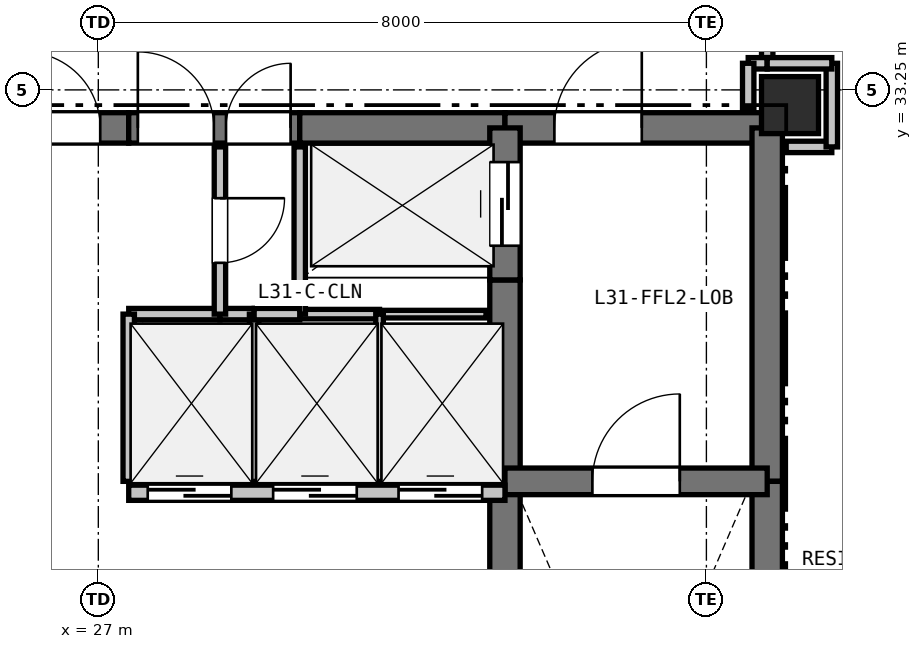
"""IFC4 building model, lengths in metres.
Left out: names, types, materials, properties, quantities, classifications, styles, units other than length and angle.
Written with IfcOpenShell. Run it as: python <this file> out.ifc"""

import sys

from ifc_helpers import new_model, si_unit, direction, frame, frame_2d, origin, origin_2d, place, context, subcontext, project, spatial, rectangle, extrude, element, fill, save


model = new_model("IFC4")
c1 = context("Model", 3, precision=1e-05, world=origin(), true_north=direction((0.0, 1.0)))
c2 = subcontext(c1, "Body", "Model", "MODEL_VIEW")
j1 = project(units=[si_unit("LENGTHUNIT", "METRE"), si_unit("PLANEANGLEUNIT", "RADIAN")], contexts=[c1])
p1 = place(None, origin())
s1 = spatial("IfcSite", under=j1, at=p1, CompositionType="ELEMENT")
p2 = place(p1, origin())
s2 = spatial("IfcBuilding", under=s1, at=p2, CompositionType="ELEMENT")
p3 = place(p2, frame((0.0, 0.0, 113.1)))
s3 = spatial("IfcBuildingStorey", under=s2, at=p3, CompositionType="ELEMENT", Elevation=113.1)
p4 = place(p3, frame((36.1, 33.05, 0.0), z_axis=(0.0, 0.0, 1.0), x_axis=(1.0, 0.0, 0.0)))
e1 = element("IfcColumn", 1, at=p4, inside=s3, PredefinedType="COLUMN", context=c2, shape_type="SweptSolid", body=[
    extrude(rectangle(XDim=0.75, YDim=0.75, at=origin_2d()), origin(), (0.0, 0.0, 1.0), 3.3),
])
p5 = place(p3, frame((25.65, 32.75, 0.0), z_axis=(0.0, 0.0, 1.0), x_axis=(1.0, 0.0, 0.0)))
e2 = element("IfcWall", 2, at=p5, inside=s3, PredefinedType="SHEAR", context=c2, shape_type="SweptSolid", body=[
    extrude(rectangle(XDim=1.75, YDim=0.4, at=frame_2d((0.875, 0.0))), origin(), (0.0, 0.0, 1.0), 3.02),
])
p6 = place(p5, frame((0.375, 0.0, 0.0)))
e3 = element("IfcOpeningElement", 3, at=p6, cuts=e2, PredefinedType="OPENING", context=c2, shape_type="SweptSolid", body=[
    extrude(rectangle(XDim=1.0, YDim=2.15, at=frame_2d((0.5, 1.075))), frame((0.0, 0.21, 0.0), z_axis=(0.0, -1.0, 0.0), x_axis=(1.0, 0.0, 0.0)), (0.0, 0.0, 1.0), 0.42),
])
p7 = place(p3, frame((27.4, 32.75, 0.0), z_axis=(0.0, 0.0, 1.0), x_axis=(1.0, 0.0, 0.0)))
e4 = element("IfcWall", 4, at=p7, inside=s3, PredefinedType="SHEAR", context=c2, shape_type="SweptSolid", body=[
    extrude(rectangle(XDim=2.25, YDim=0.4, at=frame_2d((1.125, 0.0))), origin(), (0.0, 0.0, 1.0), 3.02),
])
p8 = place(p7, frame((0.12, 0.0, 0.0)))
e5 = element("IfcOpeningElement", 5, at=p8, cuts=e4, PredefinedType="OPENING", context=c2, shape_type="SweptSolid", body=[
    extrude(rectangle(XDim=1.0, YDim=2.15, at=frame_2d((0.5, 1.075))), frame((0.0, 0.21, 0.0), z_axis=(0.0, -1.0, 0.0), x_axis=(1.0, 0.0, 0.0)), (0.0, 0.0, 1.0), 0.42),
])
p9 = place(p7, frame((1.28, 0.0, 0.0)))
e6 = element("IfcOpeningElement", 6, at=p9, cuts=e4, PredefinedType="OPENING", context=c2, shape_type="SweptSolid", body=[
    extrude(rectangle(XDim=0.85, YDim=2.1, at=frame_2d((0.425, 1.05))), frame((0.0, 0.21, 0.0), z_axis=(0.0, -1.0, 0.0), x_axis=(1.0, 0.0, 0.0)), (0.0, 0.0, 1.0), 0.42),
])
p10 = place(p3, frame((29.65, 32.75, 0.0), z_axis=(0.0, 0.0, 1.0), x_axis=(1.0, 0.0, 0.0)))
e7 = element("IfcWall", 7, at=p10, inside=s3, PredefinedType="SHEAR", context=c2, shape_type="SweptSolid", body=[
    extrude(rectangle(XDim=2.7, YDim=0.4, at=frame_2d((1.35, 0.0))), origin(), (0.0, 0.0, 1.0), 3.02),
])
p11 = place(p3, frame((32.35, 32.75, 0.0), z_axis=(0.0, 0.0, 1.0), x_axis=(1.0, 0.0, 0.0)))
e8 = element("IfcWall", 8, at=p11, inside=s3, PredefinedType="SHEAR", context=c2, shape_type="SweptSolid", body=[
    extrude(rectangle(XDim=3.45, YDim=0.4, at=frame_2d((1.725, 0.0))), origin(), (0.0, 0.0, 1.0), 3.02),
])
p12 = place(p11, frame((0.65, 0.0, 0.0)))
e9 = element("IfcOpeningElement", 9, at=p12, cuts=e8, PredefinedType="OPENING", context=c2, shape_type="SweptSolid", body=[
    extrude(rectangle(XDim=1.15, YDim=2.15, at=frame_2d((0.575, 1.075))), frame((0.0, 0.21, 0.0), z_axis=(0.0, -1.0, 0.0), x_axis=(1.0, 0.0, 0.0)), (0.0, 0.0, 1.0), 0.42),
])
p13 = place(p3, frame((35.8, 32.75, 0.0), z_axis=(0.0, 0.0, 1.0), x_axis=(0.0, -1.0, 0.0)))
e10 = element("IfcWall", 10, at=p13, inside=s3, PredefinedType="SHEAR", context=c2, shape_type="SweptSolid", body=[
    extrude(rectangle(XDim=4.65, YDim=0.4, at=frame_2d((2.325, 0.0))), origin(), (0.0, 0.0, 1.0), 3.02),
])
p14 = place(p3, frame((35.8, 28.1, 0.0), z_axis=(0.0, 0.0, 1.0), x_axis=(0.0, -1.0, 0.0)))
e11 = element("IfcWall", 11, at=p14, inside=s3, PredefinedType="SHEAR", context=c2, shape_type="SweptSolid", body=[
    extrude(rectangle(XDim=7.35, YDim=0.4, at=frame_2d((3.675, 0.0))), origin(), (0.0, 0.0, 1.0), 3.02),
])
p15 = place(p3, frame((32.35, 25.55, 0.0), z_axis=(0.0, 0.0, 1.0), x_axis=(0.0, 1.0, 0.0)))
e12 = element("IfcWall", 12, at=p15, inside=s3, PredefinedType="SHEAR", context=c2, shape_type="SweptSolid", body=[
    extrude(rectangle(XDim=2.4, YDim=0.4, at=frame_2d((1.2, 0.0))), origin(), (0.0, 0.0, 1.0), 3.02),
])
p16 = place(p3, frame((32.35, 27.95, 0.0), z_axis=(0.0, 0.0, 1.0), x_axis=(0.0, 1.0, 0.0)))
e13 = element("IfcWall", 13, at=p16, inside=s3, PredefinedType="SHEAR", context=c2, shape_type="SweptSolid", body=[
    extrude(rectangle(XDim=2.8, YDim=0.4, at=frame_2d((1.4, 0.0))), origin(), (0.0, 0.0, 1.0), 3.02),
])
p17 = place(p3, frame((32.35, 30.75, 0.0), z_axis=(0.0, 0.0, 1.0), x_axis=(0.0, 1.0, 0.0)))
e14 = element("IfcWall", 14, at=p17, inside=s3, PredefinedType="SHEAR", context=c2, shape_type="SweptSolid", body=[
    extrude(rectangle(XDim=2.0, YDim=0.4, at=frame_2d((1.0, 0.0))), origin(), (0.0, 0.0, 1.0), 3.02),
])
p18 = place(p17, frame((0.45, 0.0, 0.0)))
e15 = element("IfcOpeningElement", 15, at=p18, cuts=e14, PredefinedType="OPENING", context=c2, shape_type="SweptSolid", body=[
    extrude(rectangle(XDim=1.1, YDim=2.15, at=frame_2d((0.55, 1.075))), frame((0.0, 0.21, 0.0), z_axis=(0.0, -1.0, 0.0), x_axis=(1.0, 0.0, 0.0)), (0.0, 0.0, 1.0), 0.42),
])
p19 = place(p3, frame((32.35, 28.1, 0.0), z_axis=(0.0, 0.0, 1.0), x_axis=(1.0, 0.0, 0.0)))
e16 = element("IfcWall", 16, at=p19, inside=s3, PredefinedType="SHEAR", context=c2, shape_type="SweptSolid", body=[
    extrude(rectangle(XDim=3.45, YDim=0.35, at=frame_2d((1.725, 0.0))), origin(), (0.0, 0.0, 1.0), 3.02),
])
p20 = place(p19, frame((1.15, 0.0, 0.0)))
e17 = element("IfcOpeningElement", 17, at=p20, cuts=e16, PredefinedType="OPENING", context=c2, shape_type="SweptSolid", body=[
    extrude(rectangle(XDim=1.15, YDim=2.15, at=frame_2d((0.575, 1.075))), frame((0.0, 0.185, 0.0), z_axis=(0.0, -1.0, 0.0), x_axis=(1.0, 0.0, 0.0)), (0.0, 0.0, 1.0), 0.37),
])
p21 = place(p3, frame((27.4, 27.95, 0.0), z_axis=(0.0, 0.0, 1.0), x_axis=(1.0, 0.0, 0.0)))
e18 = element("IfcWall", 18, at=p21, inside=s3, PredefinedType="PARTITIONING", context=c2, shape_type="SweptSolid", body=[
    extrude(rectangle(XDim=4.95, YDim=0.2, at=frame_2d((2.475, 0.0))), origin(), (0.0, 0.0, 1.0), 3.02),
])
p22 = place(p21, frame((0.25, 0.0, 0.0)))
e19 = element("IfcOpeningElement", 19, at=p22, cuts=e18, PredefinedType="OPENING", context=c2, shape_type="SweptSolid", body=[
    extrude(rectangle(XDim=1.1, YDim=2.15, at=frame_2d((0.55, 1.075))), frame((0.0, 0.11, 0.0), z_axis=(0.0, -1.0, 0.0), x_axis=(1.0, 0.0, 0.0)), (0.0, 0.0, 1.0), 0.22),
])
p23 = place(p21, frame((1.9, 0.0, 0.0)))
e20 = element("IfcOpeningElement", 20, at=p23, cuts=e18, PredefinedType="OPENING", context=c2, shape_type="SweptSolid", body=[
    extrude(rectangle(XDim=1.1, YDim=2.15, at=frame_2d((0.55, 1.075))), frame((0.0, 0.11, 0.0), z_axis=(0.0, -1.0, 0.0), x_axis=(1.0, 0.0, 0.0)), (0.0, 0.0, 1.0), 0.22),
])
p24 = place(p21, frame((3.55, 0.0, 0.0)))
e21 = element("IfcOpeningElement", 21, at=p24, cuts=e18, PredefinedType="OPENING", context=c2, shape_type="SweptSolid", body=[
    extrude(rectangle(XDim=1.1, YDim=2.15, at=frame_2d((0.55, 1.075))), frame((0.0, 0.11, 0.0), z_axis=(0.0, -1.0, 0.0), x_axis=(1.0, 0.0, 0.0)), (0.0, 0.0, 1.0), 0.22),
])
p25 = place(p3, frame((32.1, 30.3, 0.0), z_axis=(0.0, 0.0, 1.0), x_axis=(-1.0, 0.0, 0.0)))
e22 = element("IfcWall", 22, at=p25, inside=s3, PredefinedType="PARTITIONING", context=c2, shape_type="SweptSolid", body=[
    extrude(rectangle(XDim=1.4, YDim=0.1, at=frame_2d((0.7, 0.0))), origin(), (0.0, 0.0, 1.0), 3.02),
])
p26 = place(p3, frame((30.7, 30.3, 0.0), z_axis=(0.0, 0.0, 1.0), x_axis=(-1.0, 0.0, 0.0)))
e23 = element("IfcWall", 23, at=p26, inside=s3, PredefinedType="PARTITIONING", context=c2, shape_type="SweptSolid", body=[
    extrude(rectangle(XDim=1.05, YDim=0.125, at=frame_2d((0.525, 0.0))), origin(), (0.0, 0.0, 1.0), 3.02),
])
p27 = place(p3, frame((29.65, 30.3, 0.0), z_axis=(0.0, 0.0, 1.0), x_axis=(0.0, 1.0, 0.0)))
e24 = element("IfcWall", 24, at=p27, inside=s3, PredefinedType="PARTITIONING", context=c2, shape_type="SweptSolid", body=[
    extrude(rectangle(XDim=2.2, YDim=0.15, at=frame_2d((1.1, 0.0))), origin(), (0.0, 0.0, 1.0), 3.02),
])
p28 = place(p3, frame((27.4, 30.3, 0.0), z_axis=(0.0, 0.0, 1.0), x_axis=(1.0, 0.0, 0.0)))
e25 = element("IfcWall", 25, at=p28, inside=s3, PredefinedType="PARTITIONING", context=c2, shape_type="SweptSolid", body=[
    extrude(rectangle(XDim=1.2, YDim=0.15, at=frame_2d((0.6, 0.0))), origin(), (0.0, 0.0, 1.0), 3.02),
])
p29 = place(p3, frame((28.6, 30.3, 0.0), z_axis=(0.0, 0.0, 1.0), x_axis=(1.0, 0.0, 0.0)))
e26 = element("IfcWall", 26, at=p29, inside=s3, PredefinedType="PARTITIONING", context=c2, shape_type="SweptSolid", body=[
    extrude(rectangle(XDim=0.45, YDim=0.15, at=frame_2d((0.225, 0.0))), origin(), (0.0, 0.0, 1.0), 3.02),
])
p30 = place(p3, frame((29.05, 30.3, 0.0), z_axis=(0.0, 0.0, 1.0), x_axis=(0.0, -1.0, 0.0)))
e27 = element("IfcWall", 27, at=p30, inside=s3, PredefinedType="PARTITIONING", context=c2, shape_type="SweptSolid", body=[
    extrude(rectangle(XDim=2.2, YDim=0.125, at=frame_2d((1.1, 0.0))), origin(), (0.0, 0.0, 1.0), 3.02),
])
p31 = place(p3, frame((27.4, 28.1, 0.0), z_axis=(0.0, 0.0, 1.0), x_axis=(0.0, 1.0, 0.0)))
e28 = element("IfcWall", 28, at=p31, inside=s3, PredefinedType="PARTITIONING", context=c2, shape_type="SweptSolid", body=[
    extrude(rectangle(XDim=2.2, YDim=0.15, at=frame_2d((1.1, 0.0))), origin(), (0.0, 0.0, 1.0), 3.02),
])
p32 = place(p3, frame((29.05, 30.3, 0.0), z_axis=(0.0, 0.0, 1.0), x_axis=(1.0, 0.0, 0.0)))
e29 = element("IfcWall", 29, at=p32, inside=s3, PredefinedType="PARTITIONING", context=c2, shape_type="SweptSolid", body=[
    extrude(rectangle(XDim=0.6, YDim=0.15, at=frame_2d((0.3, 0.0))), origin(), (0.0, 0.0, 1.0), 3.02),
])
p33 = place(p3, frame((30.7, 30.3, 0.0), z_axis=(0.0, 0.0, 1.0), x_axis=(0.0, -1.0, 0.0)))
e30 = element("IfcWall", 30, at=p33, inside=s3, PredefinedType="PARTITIONING", context=c2, shape_type="SweptSolid", body=[
    extrude(rectangle(XDim=2.2, YDim=0.1, at=frame_2d((1.1, 0.0))), origin(), (0.0, 0.0, 1.0), 3.02),
])
p34 = place(p3, frame((28.6, 32.5, 0.0), z_axis=(0.0, 0.0, 1.0), x_axis=(0.0, -1.0, 0.0)))
e31 = element("IfcWall", 31, at=p34, inside=s3, PredefinedType="PARTITIONING", context=c2, shape_type="SweptSolid", body=[
    extrude(rectangle(XDim=2.2, YDim=0.15, at=frame_2d((1.1, 0.0))), origin(), (0.0, 0.0, 1.0), 3.02),
])
p35 = place(p34, frame((0.675, 0.0, 0.0)))
e32 = element("IfcOpeningElement", 32, at=p35, cuts=e31, PredefinedType="OPENING", context=c2, shape_type="SweptSolid", body=[
    extrude(rectangle(XDim=0.85, YDim=2.1, at=frame_2d((0.425, 1.05))), frame((0.0, 0.085, 0.0), z_axis=(0.0, -1.0, 0.0), x_axis=(1.0, 0.0, 0.0)), (0.0, 0.0, 1.0), 0.17),
])
p36 = place(p3, frame((35.8, 35.35, 0.0), z_axis=(0.0, 0.0, 1.0), x_axis=(0.0, -1.0, 0.0)))
e33 = element("IfcWall", 33, at=p36, inside=s3, PredefinedType="PARTITIONING", context=c2, shape_type="SweptSolid", body=[
    extrude(rectangle(XDim=1.75, YDim=0.15, at=frame_2d((0.875, 0.0))), origin(), (0.0, 0.0, 1.0), 3.02),
])
p37 = place(p36, frame((0.375, 0.0, 0.0)))
e34 = element("IfcOpeningElement", 34, at=p37, cuts=e33, PredefinedType="OPENING", context=c2, shape_type="SweptSolid", body=[
    extrude(rectangle(XDim=1.0, YDim=2.15, at=frame_2d((0.5, 1.075))), frame((0.0, 0.085, 0.0), z_axis=(0.0, -1.0, 0.0), x_axis=(1.0, 0.0, 0.0)), (0.0, 0.0, 1.0), 0.17),
])
p38 = place(p3, frame((35.8, 33.6, 0.0), z_axis=(0.0, 0.0, 1.0), x_axis=(-1.0, 0.0, 0.0)))
e35 = element("IfcWall", 35, at=p38, inside=s3, PredefinedType="PARTITIONING", context=c2, shape_type="SweptSolid", body=[
    extrude(rectangle(XDim=0.25, YDim=0.15, at=frame_2d((0.125, 0.0))), origin(), (0.0, 0.0, 1.0), 3.02),
])
p39 = place(p3, frame((35.55, 33.6, 0.0), z_axis=(0.0, 0.0, 1.0), x_axis=(0.0, -1.0, 0.0)))
e36 = element("IfcWall", 36, at=p39, inside=s3, PredefinedType="PARTITIONING", context=c2, shape_type="SweptSolid", body=[
    extrude(rectangle(XDim=0.6, YDim=0.15, at=frame_2d((0.3, 0.0))), origin(), (0.0, 0.0, 1.0), 2.468),
])
p40 = place(p3, frame((36.05, 32.5, 0.0), z_axis=(0.0, 0.0, 1.0), x_axis=(1.0, 0.0, 0.0)))
e37 = element("IfcWall", 37, at=p40, inside=s3, PredefinedType="PARTITIONING", context=c2, shape_type="SweptSolid", body=[
    extrude(rectangle(XDim=0.6, YDim=0.15, at=frame_2d((0.3, 0.0))), origin(), (0.0, 0.0, 1.0), 2.468),
])
p41 = place(p3, frame((36.65, 32.5, 0.0), z_axis=(0.0, 0.0, 1.0), x_axis=(0.0, 1.0, 0.0)))
e38 = element("IfcWall", 38, at=p41, inside=s3, PredefinedType="PARTITIONING", context=c2, shape_type="SweptSolid", body=[
    extrude(rectangle(XDim=1.1, YDim=0.15, at=frame_2d((0.55, 0.0))), origin(), (0.0, 0.0, 1.0), 2.393),
])
p42 = place(p3, frame((36.65, 33.6, 0.0), z_axis=(0.0, 0.0, 1.0), x_axis=(-1.0, 0.0, 0.0)))
e39 = element("IfcWall", 39, at=p42, inside=s3, PredefinedType="PARTITIONING", context=c2, shape_type="SweptSolid", body=[
    extrude(rectangle(XDim=0.85, YDim=0.15, at=frame_2d((0.425, 0.0))), origin(), (0.0, 0.0, 1.0), 2.393),
])
p43 = place(p22, origin())
e40 = element("IfcDoor", 40, at=p43, inside=s3, OperationType="SLIDING_TO_LEFT", PredefinedType="DOOR", context=c2, shape_type="SweptSolid", body=[
    extrude(rectangle(XDim=1.1, YDim=2.15, at=frame_2d((0.55, 1.075))), frame((0.0, 0.025, 0.0), z_axis=(0.0, -1.0, 0.0), x_axis=(1.0, 0.0, 0.0)), (0.0, 0.0, 1.0), 0.05),
])
fill(e19, e40)
p44 = place(p23, origin())
e41 = element("IfcDoor", 41, at=p44, inside=s3, OperationType="SLIDING_TO_LEFT", PredefinedType="DOOR", context=c2, shape_type="SweptSolid", body=[
    extrude(rectangle(XDim=1.1, YDim=2.15, at=frame_2d((0.55, 1.075))), frame((0.0, 0.025, 0.0), z_axis=(0.0, -1.0, 0.0), x_axis=(1.0, 0.0, 0.0)), (0.0, 0.0, 1.0), 0.05),
])
fill(e20, e41)
p45 = place(p24, origin())
e42 = element("IfcDoor", 42, at=p45, inside=s3, OperationType="SLIDING_TO_LEFT", PredefinedType="DOOR", context=c2, shape_type="SweptSolid", body=[
    extrude(rectangle(XDim=1.1, YDim=2.15, at=frame_2d((0.55, 1.075))), frame((0.0, 0.025, 0.0), z_axis=(0.0, -1.0, 0.0), x_axis=(1.0, 0.0, 0.0)), (0.0, 0.0, 1.0), 0.05),
])
fill(e21, e42)
p46 = place(p6, origin())
e43 = element("IfcDoor", 43, at=p46, inside=s3, OperationType="SINGLE_SWING_LEFT", PredefinedType="DOOR", context=c2, shape_type="SweptSolid", body=[
    extrude(rectangle(XDim=1.0, YDim=2.15, at=frame_2d((0.5, 1.075))), frame((0.0, 0.025, 0.0), z_axis=(0.0, -1.0, 0.0), x_axis=(1.0, 0.0, 0.0)), (0.0, 0.0, 1.0), 0.05),
])
fill(e3, e43)
p47 = place(p18, origin())
e44 = element("IfcDoor", 44, at=p47, inside=s3, OperationType="SLIDING_TO_LEFT", PredefinedType="DOOR", context=c2, shape_type="SweptSolid", body=[
    extrude(rectangle(XDim=1.1, YDim=2.15, at=frame_2d((0.55, 1.075))), frame((0.0, 0.025, 0.0), z_axis=(0.0, -1.0, 0.0), x_axis=(1.0, 0.0, 0.0)), (0.0, 0.0, 1.0), 0.05),
])
fill(e15, e44)
p48 = place(p20, origin())
e45 = element("IfcDoor", 45, at=p48, inside=s3, OperationType="SINGLE_SWING_RIGHT", PredefinedType="DOOR", context=c2, shape_type="SweptSolid", body=[
    extrude(rectangle(XDim=1.15, YDim=2.15, at=frame_2d((0.575, 1.075))), frame((0.0, 0.025, 0.0), z_axis=(0.0, -1.0, 0.0), x_axis=(1.0, 0.0, 0.0)), (0.0, 0.0, 1.0), 0.05),
])
fill(e17, e45)
p49 = place(p12, origin())
e46 = element("IfcDoor", 46, at=p49, inside=s3, OperationType="SINGLE_SWING_RIGHT", PredefinedType="DOOR", context=c2, shape_type="SweptSolid", body=[
    extrude(rectangle(XDim=1.15, YDim=2.15, at=frame_2d((0.575, 1.075))), frame((0.0, 0.025, 0.0), z_axis=(0.0, -1.0, 0.0), x_axis=(1.0, 0.0, 0.0)), (0.0, 0.0, 1.0), 0.05),
])
fill(e9, e46)
p50 = place(p8, origin())
e47 = element("IfcDoor", 47, at=p50, inside=s3, OperationType="SINGLE_SWING_LEFT", PredefinedType="DOOR", context=c2, shape_type="SweptSolid", body=[
    extrude(rectangle(XDim=1.0, YDim=2.15, at=frame_2d((0.5, 1.075))), frame((0.0, 0.025, 0.0), z_axis=(0.0, -1.0, 0.0), x_axis=(1.0, 0.0, 0.0)), (0.0, 0.0, 1.0), 0.05),
])
fill(e5, e47)
p51 = place(p35, origin())
e48 = element("IfcDoor", 48, at=p51, inside=s3, OperationType="SINGLE_SWING_LEFT", PredefinedType="DOOR", context=c2, shape_type="SweptSolid", body=[
    extrude(rectangle(XDim=0.85, YDim=2.1, at=frame_2d((0.425, 1.05))), frame((0.0, 0.025, 0.0), z_axis=(0.0, -1.0, 0.0), x_axis=(1.0, 0.0, 0.0)), (0.0, 0.0, 1.0), 0.05),
])
fill(e32, e48)
p52 = place(p9, origin())
e49 = element("IfcDoor", 49, at=p52, inside=s3, OperationType="SINGLE_SWING_RIGHT", PredefinedType="DOOR", context=c2, shape_type="SweptSolid", body=[
    extrude(rectangle(XDim=0.85, YDim=2.1, at=frame_2d((0.425, 1.05))), frame((0.0, 0.025, 0.0), z_axis=(0.0, -1.0, 0.0), x_axis=(1.0, 0.0, 0.0)), (0.0, 0.0, 1.0), 0.05),
])
fill(e6, e49)
save(model, sys.argv[1])
